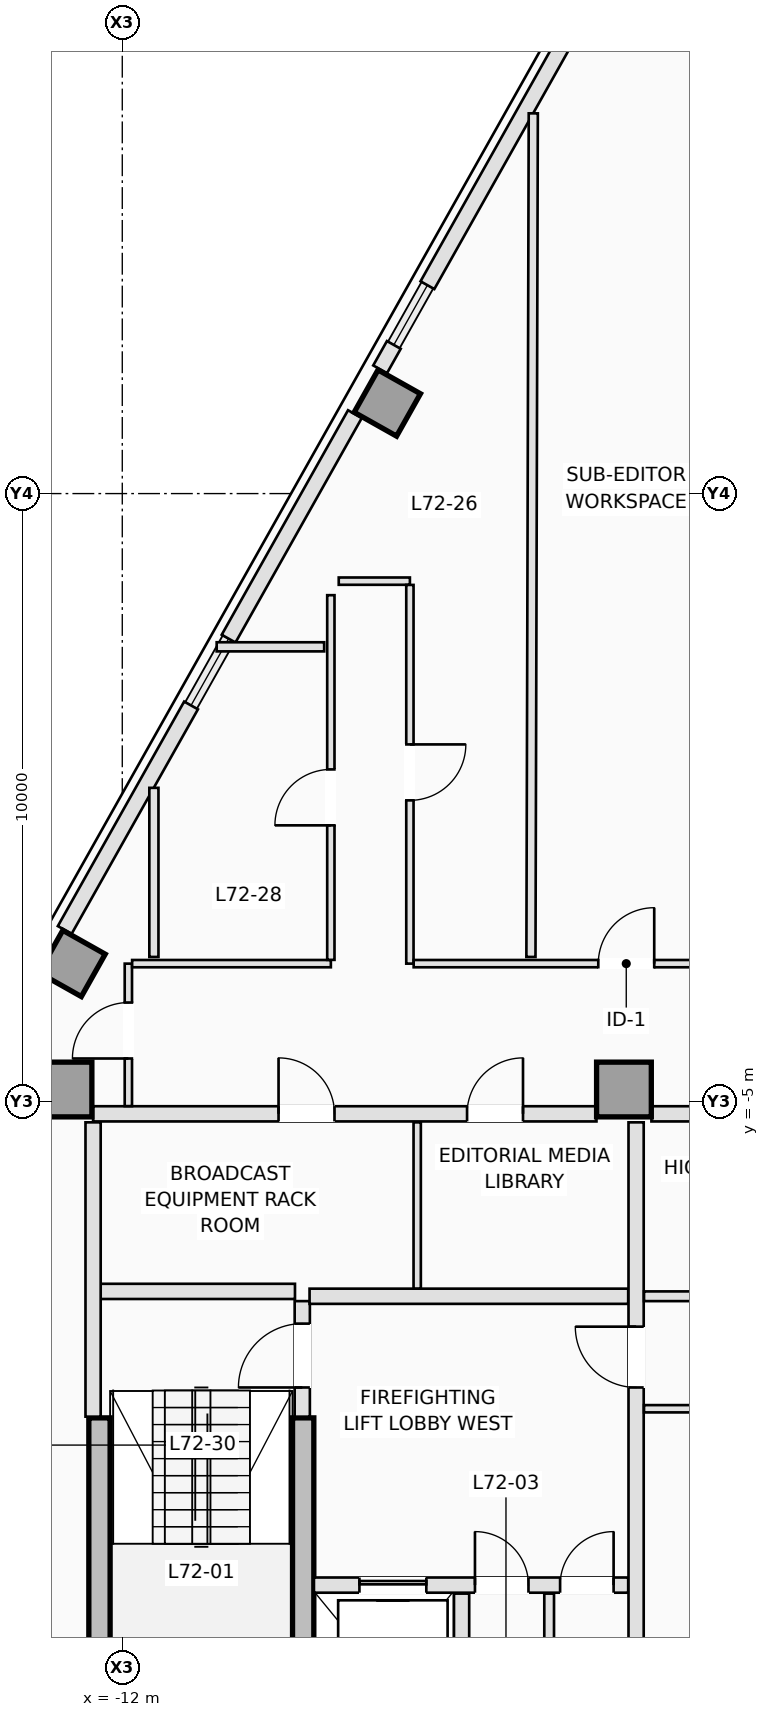
"""IFC4 building model, lengths in metres.
Left out: names, types, materials, properties, quantities, classifications, styles, units other than length and angle.
Written with IfcOpenShell. Run it as: python <this file> out.ifc"""

import sys

from ifc_helpers import new_model, si_unit, direction, frame, frame_2d, origin, origin_2d, place, context, subcontext, project, spatial, rectangle, extrude, element, fill, save


model = new_model("IFC4")
c1 = context("Model", 3, precision=1e-05, world=origin(), true_north=direction((0.0, 1.0)))
c2 = subcontext(c1, "Body", "Model", "MODEL_VIEW")
j1 = project(units=[si_unit("LENGTHUNIT", "METRE"), si_unit("PLANEANGLEUNIT", "RADIAN")], contexts=[c1])
p1 = place(None, origin())
s1 = spatial("IfcSite", under=j1, at=p1, CompositionType="ELEMENT")
p2 = place(p1, origin())
s2 = spatial("IfcBuilding", under=s1, at=p2, CompositionType="ELEMENT")
p3 = place(p2, frame((0.0, 0.0, 260.4)))
s3 = spatial("IfcBuildingStorey", under=s2, at=p3, CompositionType="ELEMENT", Elevation=260.4)
p4 = place(p3, frame((-12.375, -15.675, 0.0), z_axis=(0.0, 0.0, 1.0), x_axis=(0.0, 1.0, 0.0)))
e1 = element("IfcWall", 1, at=p4, inside=s3, PredefinedType="SHEAR", context=c2, shape_type="SweptSolid", body=[
    extrude(rectangle(XDim=5.475, YDim=0.35, at=frame_2d((2.738, 0.0))), origin(), (0.0, 0.0, 1.0), 3.5),
])
p5 = place(p3, frame((-9.025, -16.15, 0.0), z_axis=(0.0, 0.0, 1.0), x_axis=(0.0, 1.0, 0.0)))
e2 = element("IfcWall", 2, at=p5, inside=s3, PredefinedType="SHEAR", context=c2, shape_type="SweptSolid", body=[
    extrude(rectangle(XDim=5.95, YDim=0.35, at=frame_2d((2.975, 0.0))), origin(), (0.0, 0.0, 1.0), 3.5),
])
for number, where, z_axis, x_axis in (
    (3, (-12.95, -4.8, 0.0), (0.0, 0.0, 1.0), (1.0, 0.0, 0.0)),
    (4, (-3.75, -4.8, 0.0), (0.0, 0.0, 1.0), (1.0, 0.0, 0.0)),
):
    element("IfcColumn", number, at=place(p3, frame(where, z_axis=z_axis, x_axis=x_axis)), inside=s3, PredefinedType="COLUMN", context=c2, shape_type="SweptSolid", body=[
        extrude(rectangle(XDim=0.9, YDim=0.9, at=origin_2d()), origin(), (0.0, 0.0, 1.0), 3.5),
    ])
for number, where, z_axis, x_axis in (
    (5, (-7.642, 6.489, 0.0), (0.0, 0.0, 1.0), (-0.872, 0.49, 0.0)),
    (6, (-12.825, -2.727, 0.0), (0.0, 0.0, 1.0), (-0.872, 0.49, 0.0)),
):
    element("IfcColumn", number, at=place(p3, frame(where, z_axis=z_axis, x_axis=x_axis)), inside=s3, PredefinedType="COLUMN", context=c2, shape_type="SweptSolid", body=[
        extrude(rectangle(XDim=0.8, YDim=0.8, at=origin_2d()), origin(), (0.0, 0.0, 1.0), 3.5),
    ])
p6 = place(p3, frame((-7.76, 7.044, 0.0), z_axis=(0.0, 0.0, 1.0), x_axis=(0.490412424957, 0.871490478116, 0.0)))
e7 = element("IfcWall", 7, at=p6, inside=s3, PredefinedType="STANDARD", context=c2, shape_type="SweptSolid", body=[
    extrude(rectangle(XDim=0.46, YDim=0.26, at=frame_2d((0.23, 0.0))), origin(), (0.0, 0.0, 1.0), 3.25),
])
p7 = place(p3, frame((-6.982, 8.427, 0.0), z_axis=(0.0, 0.0, 1.0), x_axis=(0.490265525523, 0.871573126297, 0.0)))
e8 = element("IfcWall", 8, at=p7, inside=s3, PredefinedType="STANDARD", context=c2, shape_type="SweptSolid", body=[
    extrude(rectangle(XDim=5.409, YDim=0.26, at=frame_2d((2.705, 0.0))), origin(), (0.0, 0.0, 1.0), 3.25),
])
p8 = place(p3, frame((-12.946, -2.177, 0.0), z_axis=(0.0, 0.0, 1.0), x_axis=(0.490244825075, 0.871584770109, 0.0)))
e9 = element("IfcWall", 9, at=p8, inside=s3, PredefinedType="STANDARD", context=c2, shape_type="SweptSolid", body=[
    extrude(rectangle(XDim=4.237, YDim=0.26, at=frame_2d((2.119, 0.0))), origin(), (0.0, 0.0, 1.0), 3.25),
])
p9 = place(p3, frame((-10.251, 2.615, 0.0), z_axis=(0.0, 0.0, 1.0), x_axis=(0.490269447258, 0.871570920284, 0.0)))
e10 = element("IfcWall", 10, at=p9, inside=s3, PredefinedType="STANDARD", context=c2, shape_type="SweptSolid", body=[
    extrude(rectangle(XDim=4.237, YDim=0.26, at=frame_2d((2.118, 0.0))), origin(), (0.0, 0.0, 1.0), 3.25),
])
p10 = place(p3, frame((-9.04, -10.18, 0.0), z_axis=(0.0, 0.0, 1.0), x_axis=(0.0, 1.0, 0.0)))
e11 = element("IfcWall", 11, at=p10, inside=s3, PredefinedType="PARTITIONING", context=c2, shape_type="SweptSolid", body=[
    extrude(rectangle(XDim=1.9, YDim=0.25, at=frame_2d((0.95, 0.0))), origin(), (0.0, 0.0, 1.0), 3.25),
])
p11 = place(p10, frame((0.48, 0.0, 0.0)))
e12 = element("IfcOpeningElement", 12, at=p11, cuts=e11, PredefinedType="OPENING", context=c2, shape_type="SweptSolid", body=[
    extrude(rectangle(XDim=1.05, YDim=2.15, at=frame_2d((0.525, 1.075))), frame((0.0, 0.135, 0.0), z_axis=(0.0, -1.0, 0.0), x_axis=(1.0, 0.0, 0.0)), (0.0, 0.0, 1.0), 0.27),
])
p12 = place(p3, frame((-12.38, -8.12, 0.0), z_axis=(0.0, 0.0, 1.0), x_axis=(1.0, 0.0, 0.0)))
e13 = element("IfcWall", 13, at=p12, inside=s3, PredefinedType="PARTITIONING", context=c2, shape_type="SweptSolid", body=[
    extrude(rectangle(XDim=3.22, YDim=0.25, at=frame_2d((1.61, 0.0))), origin(), (0.0, 0.0, 1.0), 3.25),
])
p13 = place(p3, frame((-12.48, -10.18, 0.0), z_axis=(0.0, 0.0, 1.0), x_axis=(0.0, 1.0, 0.0)))
e14 = element("IfcWall", 14, at=p13, inside=s3, PredefinedType="PARTITIONING", context=c2, shape_type="SweptSolid", body=[
    extrude(rectangle(XDim=4.84, YDim=0.25, at=frame_2d((2.42, 0.0))), origin(), (0.0, 0.0, 1.0), 3.25),
])
p14 = place(p3, frame((-8.848, -12.95, 0.0), z_axis=(0.0, 0.0, 1.0), x_axis=(1.0, 0.0, 0.0)))
e15 = element("IfcWall", 15, at=p14, inside=s3, PredefinedType="PARTITIONING", context=c2, shape_type="SweptSolid", body=[
    extrude(rectangle(XDim=5.168, YDim=0.25, at=frame_2d((2.584, 0.0))), origin(), (0.0, 0.0, 1.0), 3.25),
])
p15 = place(p14, frame((0.748, 0.0, 0.0)))
e16 = element("IfcOpeningElement", 16, at=p15, cuts=e15, PredefinedType="OPENING", context=c2, shape_type="SweptSolid", body=[
    extrude(rectangle(XDim=1.1, YDim=2.15, at=frame_2d((0.55, 1.075))), frame((0.0, 0.135, 0.0), z_axis=(0.0, -1.0, 0.0), x_axis=(1.0, 0.0, 0.0)), (0.0, 0.0, 1.0), 0.27),
])
p16 = place(p14, frame((2.648, 0.0, 0.0)))
e17 = element("IfcOpeningElement", 17, at=p16, cuts=e15, PredefinedType="OPENING", context=c2, shape_type="SweptSolid", body=[
    extrude(rectangle(XDim=0.88, YDim=2.1, at=frame_2d((0.44, 1.05))), frame((0.0, 0.135, 0.0), z_axis=(0.0, -1.0, 0.0), x_axis=(1.0, 0.0, 0.0)), (0.0, 0.0, 1.0), 0.27),
])
p17 = place(p14, frame((4.048, 0.0, 0.0)))
e18 = element("IfcOpeningElement", 18, at=p17, cuts=e15, PredefinedType="OPENING", context=c2, shape_type="SweptSolid", body=[
    extrude(rectangle(XDim=0.88, YDim=2.1, at=frame_2d((0.44, 1.05))), frame((0.0, 0.135, 0.0), z_axis=(0.0, -1.0, 0.0), x_axis=(1.0, 0.0, 0.0)), (0.0, 0.0, 1.0), 0.27),
])
p18 = place(p3, frame((-6.42, -15.92, 0.0), z_axis=(0.0, 0.0, 1.0), x_axis=(0.0, 1.0, 0.0)))
e19 = element("IfcWall", 19, at=p18, inside=s3, PredefinedType="PARTITIONING", context=c2, shape_type="SweptSolid", body=[
    extrude(rectangle(XDim=2.83, YDim=0.25, at=frame_2d((1.415, 0.0))), origin(), (0.0, 0.0, 1.0), 3.25),
])
p19 = place(p3, frame((-4.98, -15.92, 0.0), z_axis=(0.0, 0.0, 1.0), x_axis=(0.0, 1.0, 0.0)))
e20 = element("IfcWall", 20, at=p19, inside=s3, PredefinedType="PARTITIONING", context=c2, shape_type="SweptSolid", body=[
    extrude(rectangle(XDim=2.83, YDim=0.16, at=frame_2d((1.415, 0.0))), origin(), (0.0, 0.0, 1.0), 3.25),
])
p20 = place(p3, frame((-8.92, -8.2, 0.0), z_axis=(0.0, 0.0, 1.0), x_axis=(1.0, 0.0, 0.0)))
e21 = element("IfcWall", 21, at=p20, inside=s3, PredefinedType="PARTITIONING", context=c2, shape_type="SweptSolid", body=[
    extrude(rectangle(XDim=5.24, YDim=0.25, at=frame_2d((2.62, 0.0))), origin(), (0.0, 0.0, 1.0), 3.25),
])
p21 = place(p3, frame((-3.55, -15.898, 0.0), z_axis=(0.0, 0.0, 1.0), x_axis=(0.0, 1.0, 0.0)))
e22 = element("IfcWall", 22, at=p21, inside=s3, PredefinedType="PARTITIONING", context=c2, shape_type="SweptSolid", body=[
    extrude(rectangle(XDim=10.558, YDim=0.25, at=frame_2d((5.279, 0.0))), origin(), (0.0, 0.0, 1.0), 3.25),
])
p22 = place(p21, frame((6.198, 0.0, 0.0)))
e23 = element("IfcOpeningElement", 23, at=p22, cuts=e22, PredefinedType="OPENING", context=c2, shape_type="SweptSolid", body=[
    extrude(rectangle(XDim=1.0, YDim=2.15, at=frame_2d((0.5, 1.075))), frame((0.0, 0.135, 0.0), z_axis=(0.0, -1.0, 0.0), x_axis=(1.0, 0.0, 0.0)), (0.0, 0.0, 1.0), 0.27),
])
p23 = place(p3, frame((-12.48, -5.2, 0.0), z_axis=(0.0, 0.0, 1.0), x_axis=(1.0, 0.0, 0.0)))
e24 = element("IfcWall", 24, at=p23, inside=s3, PredefinedType="PARTITIONING", context=c2, shape_type="SweptSolid", body=[
    extrude(rectangle(XDim=8.278, YDim=0.25, at=frame_2d((4.139, 0.0))), origin(), (0.0, 0.0, 1.0), 3.25),
])
p24 = place(p23, frame((3.05, 0.0, 0.0)))
e25 = element("IfcOpeningElement", 25, at=p24, cuts=e24, PredefinedType="OPENING", context=c2, shape_type="SweptSolid", body=[
    extrude(rectangle(XDim=0.92, YDim=2.12, at=frame_2d((0.46, 1.06))), frame((0.0, 0.135, 0.0), z_axis=(0.0, -1.0, 0.0), x_axis=(1.0, 0.0, 0.0)), (0.0, 0.0, 1.0), 0.27),
])
p25 = place(p23, frame((6.15, 0.0, 0.0)))
e26 = element("IfcOpeningElement", 26, at=p25, cuts=e24, PredefinedType="OPENING", context=c2, shape_type="SweptSolid", body=[
    extrude(rectangle(XDim=0.92, YDim=2.12, at=frame_2d((0.46, 1.06))), frame((0.0, 0.135, 0.0), z_axis=(0.0, -1.0, 0.0), x_axis=(1.0, 0.0, 0.0)), (0.0, 0.0, 1.0), 0.27),
])
p26 = place(p3, frame((-3.298, -5.2, 0.0), z_axis=(0.0, 0.0, 1.0), x_axis=(1.0, 0.0, 0.0)))
e27 = element("IfcWall", 27, at=p26, inside=s3, PredefinedType="PARTITIONING", context=c2, shape_type="SweptSolid", body=[
    extrude(rectangle(XDim=2.348, YDim=0.25, at=frame_2d((1.174, 0.0))), origin(), (0.0, 0.0, 1.0), 3.25),
])
p27 = place(p3, frame((-7.15, -8.073, 0.0), z_axis=(0.0, 0.0, 1.0), x_axis=(0.0, 1.0, 0.0)))
e28 = element("IfcWall", 28, at=p27, inside=s3, PredefinedType="PARTITIONING", context=c2, shape_type="SweptSolid", body=[
    extrude(rectangle(XDim=2.733, YDim=0.12, at=frame_2d((1.366, 0.0))), origin(), (0.0, 0.0, 1.0), 3.25),
])
p28 = place(p3, frame((-3.42, -8.2, 0.0), z_axis=(0.0, 0.0, 1.0), x_axis=(1.0, 0.0, 0.0)))
e29 = element("IfcWall", 29, at=p28, inside=s3, PredefinedType="PARTITIONING", context=c2, shape_type="SweptSolid", body=[
    extrude(rectangle(XDim=6.84, YDim=0.16, at=frame_2d((3.42, 0.0))), origin(), (0.0, 0.0, 1.0), 3.25),
])
p29 = place(p28, frame((2.92, 0.0, 0.0)))
e30 = element("IfcOpeningElement", 30, at=p29, cuts=e29, PredefinedType="OPENING", context=c2, shape_type="SweptSolid", body=[
    extrude(rectangle(XDim=1.0, YDim=2.15, at=frame_2d((0.5, 1.075))), frame((0.0, 0.09, 0.0), z_axis=(0.0, -1.0, 0.0), x_axis=(1.0, 0.0, 0.0)), (0.0, 0.0, 1.0), 0.18),
])
p30 = place(p3, frame((-3.42, -10.05, 0.0), z_axis=(0.0, 0.0, 1.0), x_axis=(1.0, 0.0, 0.0)))
e31 = element("IfcWall", 31, at=p30, inside=s3, PredefinedType="PARTITIONING", context=c2, shape_type="SweptSolid", body=[
    extrude(rectangle(XDim=6.84, YDim=0.12, at=frame_2d((3.42, 0.0))), origin(), (0.0, 0.0, 1.0), 3.25),
])
p31 = place(p30, frame((2.95, 0.0, 0.0)))
e32 = element("IfcOpeningElement", 32, at=p31, cuts=e31, PredefinedType="OPENING", context=c2, shape_type="SweptSolid", body=[
    extrude(rectangle(XDim=0.92, YDim=2.12, at=frame_2d((0.46, 1.06))), frame((0.0, 0.07, 0.0), z_axis=(0.0, -1.0, 0.0), x_axis=(1.0, 0.0, 0.0)), (0.0, 0.0, 1.0), 0.14),
])
p32 = place(p3, frame((-11.9, -5.073, 0.0), z_axis=(0.0, 0.0, 1.0), x_axis=(0.0, 1.0, 0.0)))
e33 = element("IfcWall", 33, at=p32, inside=s3, PredefinedType="PARTITIONING", context=c2, shape_type="SweptSolid", body=[
    extrude(rectangle(XDim=2.343, YDim=0.12, at=frame_2d((1.171, 0.0))), origin(), (0.0, 0.0, 1.0), 3.25),
])
p33 = place(p32, frame((0.783, 0.0, 0.0)))
e34 = element("IfcOpeningElement", 34, at=p33, cuts=e33, PredefinedType="OPENING", context=c2, shape_type="SweptSolid", body=[
    extrude(rectangle(XDim=0.92, YDim=2.12, at=frame_2d((0.46, 1.06))), frame((0.0, 0.07, 0.0), z_axis=(0.0, -1.0, 0.0), x_axis=(1.0, 0.0, 0.0)), (0.0, 0.0, 1.0), 0.14),
])
p34 = place(p3, frame((-11.838, -2.73, 0.0), z_axis=(0.0, 0.0, 1.0), x_axis=(1.0, 0.0, 0.0)))
e35 = element("IfcWall", 35, at=p34, inside=s3, PredefinedType="PARTITIONING", context=c2, shape_type="SweptSolid", body=[
    extrude(rectangle(XDim=3.268, YDim=0.12, at=frame_2d((1.634, 0.0))), origin(), (0.0, 0.0, 1.0), 3.25),
])
p35 = place(p3, frame((-8.57, -2.668, 0.0), z_axis=(0.0, 0.0, 1.0), x_axis=(0.0, 1.0, 0.0)))
e36 = element("IfcWall", 36, at=p35, inside=s3, PredefinedType="PARTITIONING", context=c2, shape_type="SweptSolid", body=[
    extrude(rectangle(XDim=5.997, YDim=0.12, at=frame_2d((2.999, 0.0))), origin(), (0.0, 0.0, 1.0), 3.25),
])
p36 = place(p35, frame((2.212, 0.0, 0.0)))
e37 = element("IfcOpeningElement", 37, at=p36, cuts=e36, PredefinedType="OPENING", context=c2, shape_type="SweptSolid", body=[
    extrude(rectangle(XDim=0.92, YDim=2.12, at=frame_2d((0.46, 1.06))), frame((0.0, 0.07, 0.0), z_axis=(0.0, -1.0, 0.0), x_axis=(1.0, 0.0, 0.0)), (0.0, 0.0, 1.0), 0.14),
])
p37 = place(p3, frame((-8.44, 3.56, 0.0), z_axis=(0.0, 0.0, 1.0), x_axis=(1.0, 0.0, 0.0)))
e38 = element("IfcWall", 38, at=p37, inside=s3, PredefinedType="PARTITIONING", context=c2, shape_type="SweptSolid", body=[
    extrude(rectangle(XDim=1.17, YDim=0.12, at=frame_2d((0.585, 0.0))), origin(), (0.0, 0.0, 1.0), 3.25),
])
p38 = place(p3, frame((-7.27, 3.498, 0.0), z_axis=(0.0, 0.0, 1.0), x_axis=(0.0, -1.0, 0.0)))
e39 = element("IfcWall", 39, at=p38, inside=s3, PredefinedType="PARTITIONING", context=c2, shape_type="SweptSolid", body=[
    extrude(rectangle(XDim=6.228, YDim=0.12, at=frame_2d((3.114, 0.0))), origin(), (0.0, 0.0, 1.0), 3.25),
])
p39 = place(p38, frame((2.623, 0.0, 0.0)))
e40 = element("IfcOpeningElement", 40, at=p39, cuts=e39, PredefinedType="OPENING", context=c2, shape_type="SweptSolid", body=[
    extrude(rectangle(XDim=0.92, YDim=2.12, at=frame_2d((0.46, 1.06))), frame((0.0, 0.07, 0.0), z_axis=(0.0, -1.0, 0.0), x_axis=(1.0, 0.0, 0.0)), (0.0, 0.0, 1.0), 0.14),
])
p40 = place(p3, frame((-7.208, -2.73, 0.0), z_axis=(0.0, 0.0, 1.0), x_axis=(1.0, 0.0, 0.0)))
e41 = element("IfcWall", 41, at=p40, inside=s3, PredefinedType="PARTITIONING", context=c2, shape_type="SweptSolid", body=[
    extrude(rectangle(XDim=8.386, YDim=0.12, at=frame_2d((4.193, 0.0))), origin(), (0.0, 0.0, 1.0), 2.943),
])
p41 = place(p40, frame((6.161, 0.0, 0.0)))
e42 = element("IfcOpeningElement", 42, at=p41, cuts=e41, PredefinedType="OPENING", context=c2, shape_type="SweptSolid", body=[
    extrude(rectangle(XDim=0.92, YDim=2.12, at=frame_2d((0.46, 1.06))), frame((0.0, 0.07, 0.0), z_axis=(0.0, -1.0, 0.0), x_axis=(1.0, 0.0, 0.0)), (0.0, 0.0, 1.0), 0.14),
])
p42 = place(p40, frame((3.036, 0.0, 0.0)))
e43 = element("IfcOpeningElement", 43, at=p42, cuts=e41, PredefinedType="OPENING", context=c2, shape_type="SweptSolid", body=[
    extrude(rectangle(XDim=0.92, YDim=2.12, at=frame_2d((0.46, 1.06))), frame((0.0, 0.07, 0.0), z_axis=(0.0, -1.0, 0.0), x_axis=(1.0, 0.0, 0.0)), (0.0, 0.0, 1.0), 0.14),
])
p43 = place(p3, frame((-5.28, -2.62, 0.0), z_axis=(0.0, 0.0, 1.0), x_axis=(0.002780553459, 0.999996134254, 0.0)))
e44 = element("IfcWall", 44, at=p43, inside=s3, PredefinedType="PARTITIONING", context=c2, shape_type="SweptSolid", body=[
    extrude(rectangle(XDim=13.873, YDim=0.15, at=frame_2d((6.937, 0.0))), origin(), (0.0, 0.0, 1.0), 3.25),
])
p44 = place(p3, frame((-8.68, 2.48, 0.0), z_axis=(0.0, 0.0, 1.0), x_axis=(-1.0, 0.0, 0.0)))
e45 = element("IfcWall", 45, at=p44, inside=s3, PredefinedType="PARTITIONING", context=c2, shape_type="SweptSolid", body=[
    extrude(rectangle(XDim=1.768, YDim=0.15, at=frame_2d((0.884, 0.0))), origin(), (0.0, 0.0, 1.0), 3.25),
])
p45 = place(p3, frame((-11.48, -2.62, 0.0), z_axis=(0.0, 0.0, 1.0), x_axis=(0.0, 1.0, 0.0)))
e46 = element("IfcWall", 46, at=p45, inside=s3, PredefinedType="PARTITIONING", context=c2, shape_type="SweptSolid", body=[
    extrude(rectangle(XDim=2.781, YDim=0.15, at=frame_2d((1.391, 0.0))), origin(), (0.0, 0.0, 1.0), 3.25),
])
p46 = place(p15, origin())
e47 = element("IfcDoor", 47, at=p46, inside=s3, OperationType="SLIDING_TO_LEFT", PredefinedType="DOOR", context=c2, shape_type="SweptSolid", body=[
    extrude(rectangle(XDim=1.1, YDim=2.15, at=frame_2d((0.55, 1.075))), frame((0.0, 0.025, 0.0), z_axis=(0.0, -1.0, 0.0), x_axis=(1.0, 0.0, 0.0)), (0.0, 0.0, 1.0), 0.05),
])
fill(e16, e47)
p47 = place(p11, origin())
e48 = element("IfcDoor", 48, at=p47, inside=s3, OperationType="SINGLE_SWING_LEFT", PredefinedType="DOOR", context=c2, shape_type="SweptSolid", body=[
    extrude(rectangle(XDim=1.05, YDim=2.15, at=frame_2d((0.525, 1.075))), frame((0.0, 0.025, 0.0), z_axis=(0.0, -1.0, 0.0), x_axis=(1.0, 0.0, 0.0)), (0.0, 0.0, 1.0), 0.05),
])
fill(e12, e48)
p48 = place(p16, origin())
e49 = element("IfcDoor", 49, at=p48, inside=s3, OperationType="SINGLE_SWING_LEFT", PredefinedType="TRAPDOOR", context=c2, shape_type="SweptSolid", body=[
    extrude(rectangle(XDim=0.88, YDim=2.1, at=frame_2d((0.44, 1.05))), frame((0.0, 0.025, 0.0), z_axis=(0.0, -1.0, 0.0), x_axis=(1.0, 0.0, 0.0)), (0.0, 0.0, 1.0), 0.05),
])
fill(e17, e49)
p49 = place(p17, origin())
e50 = element("IfcDoor", 50, at=p49, inside=s3, OperationType="SINGLE_SWING_RIGHT", PredefinedType="TRAPDOOR", context=c2, shape_type="SweptSolid", body=[
    extrude(rectangle(XDim=0.88, YDim=2.1, at=frame_2d((0.44, 1.05))), frame((0.0, 0.025, 0.0), z_axis=(0.0, -1.0, 0.0), x_axis=(1.0, 0.0, 0.0)), (0.0, 0.0, 1.0), 0.05),
])
fill(e18, e50)
p50 = place(p22, origin())
e51 = element("IfcDoor", 51, at=p50, inside=s3, OperationType="SINGLE_SWING_RIGHT", PredefinedType="DOOR", context=c2, shape_type="SweptSolid", body=[
    extrude(rectangle(XDim=1.0, YDim=2.15, at=frame_2d((0.5, 1.075))), frame((0.0, 0.025, 0.0), z_axis=(0.0, -1.0, 0.0), x_axis=(1.0, 0.0, 0.0)), (0.0, 0.0, 1.0), 0.05),
])
fill(e23, e51)
p51 = place(p24, origin())
e52 = element("IfcDoor", 52, at=p51, inside=s3, OperationType="SINGLE_SWING_LEFT", PredefinedType="DOOR", context=c2, shape_type="SweptSolid", body=[
    extrude(rectangle(XDim=0.92, YDim=2.12, at=frame_2d((0.46, 1.06))), frame((0.0, 0.025, 0.0), z_axis=(0.0, -1.0, 0.0), x_axis=(1.0, 0.0, 0.0)), (0.0, 0.0, 1.0), 0.05),
])
fill(e25, e52)
p52 = place(p25, origin())
e53 = element("IfcDoor", 53, at=p52, inside=s3, OperationType="SINGLE_SWING_RIGHT", PredefinedType="DOOR", context=c2, shape_type="SweptSolid", body=[
    extrude(rectangle(XDim=0.92, YDim=2.12, at=frame_2d((0.46, 1.06))), frame((0.0, 0.025, 0.0), z_axis=(0.0, -1.0, 0.0), x_axis=(1.0, 0.0, 0.0)), (0.0, 0.0, 1.0), 0.05),
])
fill(e26, e53)
p53 = place(p42, origin())
e54 = element("IfcDoor", 54, at=p53, inside=s3, OperationType="SINGLE_SWING_RIGHT", PredefinedType="DOOR", context=c2, shape_type="SweptSolid", body=[
    extrude(rectangle(XDim=0.92, YDim=2.12, at=frame_2d((0.46, 1.06))), frame((0.0, 0.025, 0.0), z_axis=(0.0, -1.0, 0.0), x_axis=(1.0, 0.0, 0.0)), (0.0, 0.0, 1.0), 0.05),
])
fill(e43, e54)
p54 = place(p39, origin())
e55 = element("IfcDoor", 55, at=p54, inside=s3, OperationType="SINGLE_SWING_LEFT", PredefinedType="DOOR", context=c2, shape_type="SweptSolid", body=[
    extrude(rectangle(XDim=0.92, YDim=2.12, at=frame_2d((0.46, 1.06))), frame((0.0, 0.025, 0.0), z_axis=(0.0, -1.0, 0.0), x_axis=(1.0, 0.0, 0.0)), (0.0, 0.0, 1.0), 0.05),
])
fill(e40, e55)
p55 = place(p36, origin())
e56 = element("IfcDoor", 56, at=p55, inside=s3, OperationType="SINGLE_SWING_LEFT", PredefinedType="DOOR", context=c2, shape_type="SweptSolid", body=[
    extrude(rectangle(XDim=0.92, YDim=2.12, at=frame_2d((0.46, 1.06))), frame((0.0, 0.025, 0.0), z_axis=(0.0, -1.0, 0.0), x_axis=(1.0, 0.0, 0.0)), (0.0, 0.0, 1.0), 0.05),
])
fill(e37, e56)
p56 = place(p33, origin())
e57 = element("IfcDoor", 57, at=p56, inside=s3, OperationType="SINGLE_SWING_LEFT", PredefinedType="DOOR", context=c2, shape_type="SweptSolid", body=[
    extrude(rectangle(XDim=0.92, YDim=2.12, at=frame_2d((0.46, 1.06))), frame((0.0, 0.025, 0.0), z_axis=(0.0, -1.0, 0.0), x_axis=(1.0, 0.0, 0.0)), (0.0, 0.0, 1.0), 0.05),
])
fill(e34, e57)
save(model, sys.argv[1])
